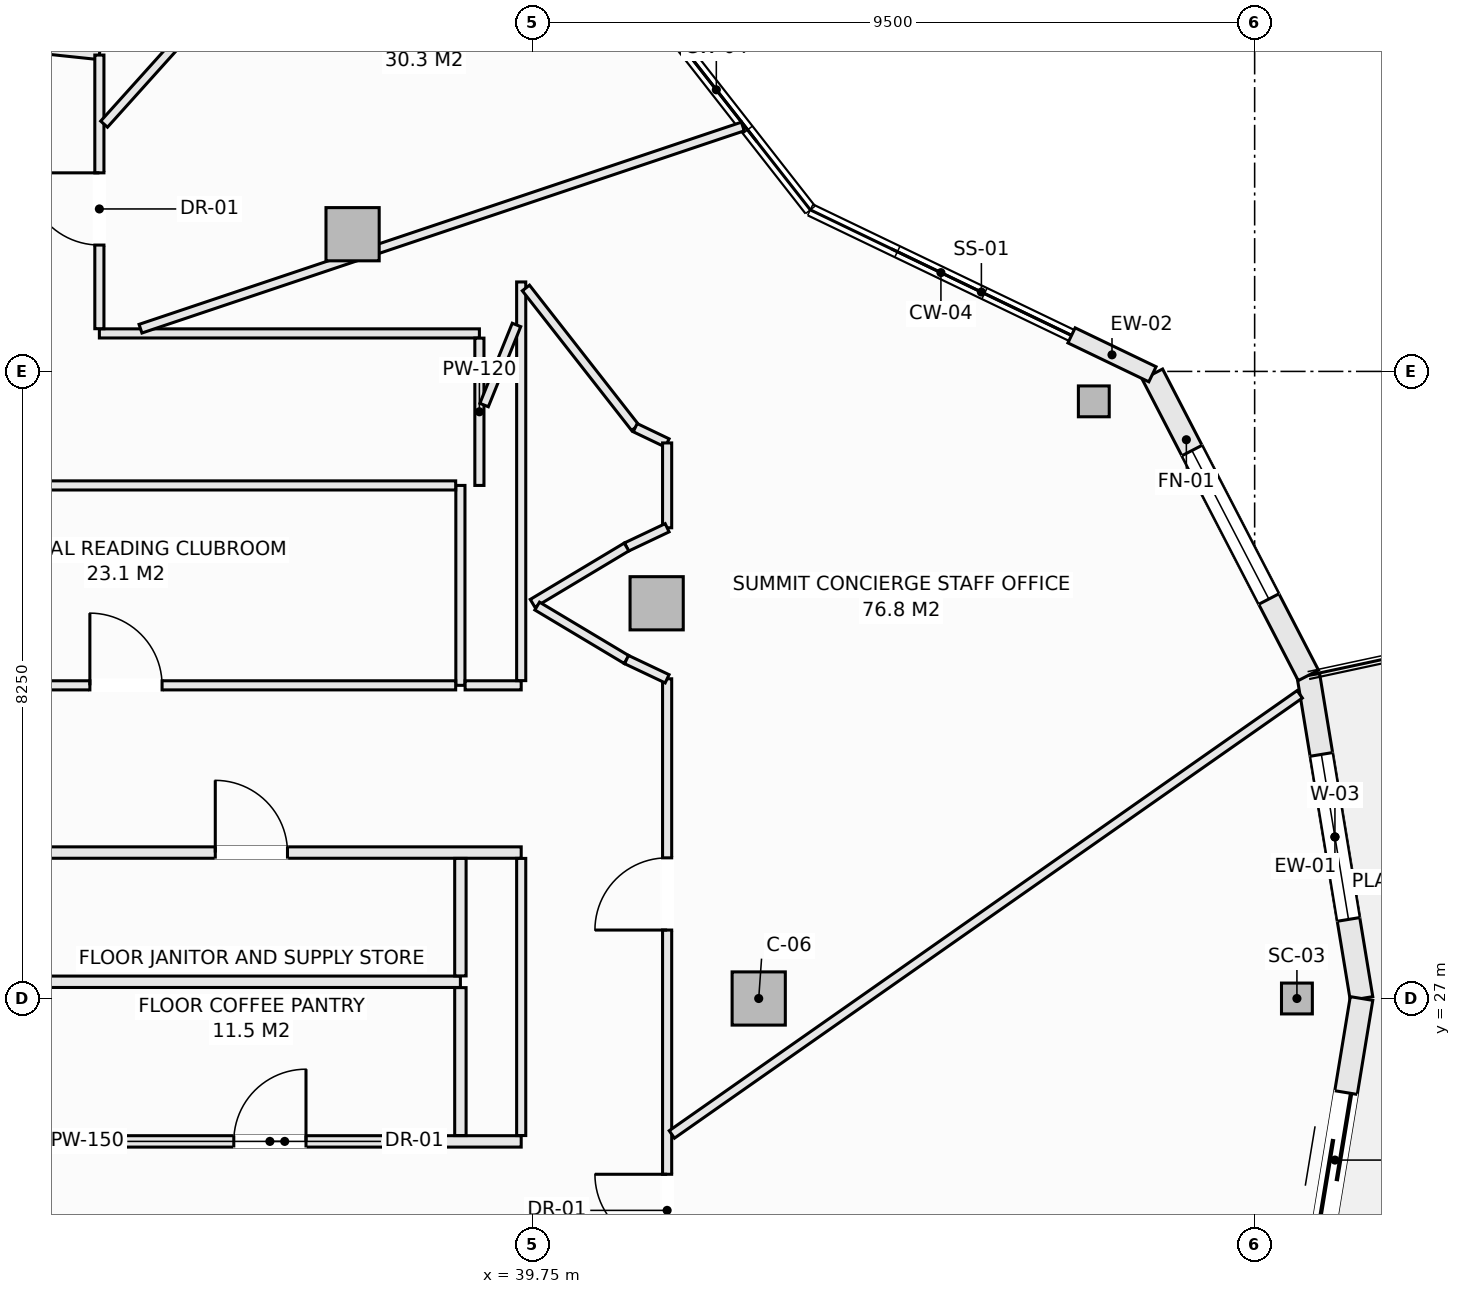
"""IFC4 building model, lengths in metres.
Left out: names, types, materials, properties, quantities, classifications, styles, units other than length and angle.
Written with IfcOpenShell. Run it as: python <this file> out.ifc"""

import sys

from ifc_helpers import new_model, si_unit, direction, frame, frame_2d, origin, origin_2d, place, context, subcontext, project, spatial, rectangle, hollow_rectangle, extrude, element, fill, save


model = new_model("IFC4")
c1 = context("Model", 3, precision=1e-05, world=origin(), true_north=direction((0.0, 1.0)))
c2 = subcontext(c1, "Body", "Model", "MODEL_VIEW")
j1 = project(units=[si_unit("LENGTHUNIT", "METRE"), si_unit("PLANEANGLEUNIT", "RADIAN")], contexts=[c1])
p1 = place(None, origin())
s1 = spatial("IfcSite", under=j1, at=p1, CompositionType="ELEMENT")
p2 = place(p1, origin())
s2 = spatial("IfcBuilding", under=s1, at=p2, CompositionType="ELEMENT")
p3 = place(p2, frame((0.0, 0.0, 272.3)))
s3 = spatial("IfcBuildingStorey", under=s2, at=p3, CompositionType="ELEMENT", Elevation=272.3)
for number, where, z_axis, x_axis in (
    (1, (49.806, 27.0, -0.27), (0.0, 0.0, 1.0), (1.0, 0.0, 0.0)),
    (2, (47.134, 34.856, -0.27), (0.0, 0.0, 1.0), (1.0, 0.0, 0.0)),
):
    element("IfcColumn", number, at=place(p3, frame(where, z_axis=z_axis, x_axis=x_axis)), inside=s3, PredefinedType="COLUMN", context=c2, shape_type="SweptSolid", body=[
        extrude(hollow_rectangle(XDim=0.406, YDim=0.406, WallThickness=0.016, at=origin_2d()), origin(), (0.0, 0.0, 1.0), 3.25),
    ])
for number, where, z_axis, x_axis in (
    (3, (42.725, 27.0, -0.27), (0.0, 0.0, 1.0), (1.0, 0.0, 0.0)),
    (4, (41.382, 32.199, -0.27), (0.0, 0.0, 1.0), (1.0, 0.0, 0.0)),
    (5, (37.382, 37.055, -0.27), (0.0, 0.0, 1.0), (1.0, 0.0, 0.0)),
):
    element("IfcColumn", number, at=place(p3, frame(where, z_axis=z_axis, x_axis=x_axis)), inside=s3, PredefinedType="COLUMN", context=c2, shape_type="SweptSolid", body=[
        extrude(rectangle(XDim=0.7, YDim=0.7, at=origin_2d()), origin(), (0.0, 0.0, 1.0), 3.25),
    ])
p4 = place(p3, frame((49.957, 31.251, 0.0), z_axis=(0.0, 0.0, 1.0), x_axis=(0.162404622434, -0.98672424649, 0.0)))
e6 = element("IfcWall", 6, at=p4, inside=s3, PredefinedType="SOLIDWALL", context=c2, shape_type="SweptSolid", body=[
    extrude(rectangle(XDim=4.308, YDim=0.3, at=frame_2d((2.154, 0.0))), origin(), (0.0, 0.0, 1.0), 2.555),
])
p5 = place(p4, frame((1.054, 0.0, 0.72)))
e7 = element("IfcOpeningElement", 7, at=p5, cuts=e6, PredefinedType="OPENING", context=c2, shape_type="SweptSolid", body=[
    extrude(rectangle(XDim=2.2, YDim=1.65, at=frame_2d((1.1, 0.825))), frame((0.0, 0.16, 0.0), z_axis=(0.0, -1.0, 0.0), x_axis=(1.0, 0.0, 0.0)), (0.0, 0.0, 1.0), 0.32),
])
p6 = place(p3, frame((47.906, 35.212, 0.0), z_axis=(0.0, 0.0, 1.0), x_axis=(0.459801070243, -0.888021945564, 0.0)))
e8 = element("IfcWall", 8, at=p6, inside=s3, PredefinedType="SOLIDWALL", context=c2, shape_type="SweptSolid", body=[
    extrude(rectangle(XDim=4.461, YDim=0.3, at=frame_2d((2.23, 0.0))), origin(), (0.0, 0.0, 1.0), 2.555),
])
p7 = place(p6, frame((1.13, 0.0, 0.72)))
e9 = element("IfcOpeningElement", 9, at=p7, cuts=e8, PredefinedType="OPENING", context=c2, shape_type="SweptSolid", body=[
    extrude(rectangle(XDim=2.2, YDim=1.65, at=frame_2d((1.1, 0.825))), frame((0.0, 0.16, 0.0), z_axis=(0.0, -1.0, 0.0), x_axis=(1.0, 0.0, 0.0)), (0.0, 0.0, 1.0), 0.32),
])
p8 = place(p3, frame((46.841, 35.724, 0.0), z_axis=(0.0, 0.0, 1.0), x_axis=(0.901303636532, -0.433187897769, 0.0)))
e10 = element("IfcWall", 10, at=p8, inside=s3, PredefinedType="SOLIDWALL", context=c2, shape_type="SweptSolid", body=[
    extrude(rectangle(XDim=1.181, YDim=0.22, at=frame_2d((0.591, 0.0))), origin(), (0.0, 0.0, 1.0), 2.555),
])
p9 = place(p3, frame((49.957, 22.749, 0.0), z_axis=(0.0, 0.0, 1.0), x_axis=(0.162404622434, 0.98672424649, 0.0)))
e11 = element("IfcWall", 11, at=p9, inside=s3, PredefinedType="SOLIDWALL", context=c2, shape_type="SweptSolid", body=[
    extrude(rectangle(XDim=4.308, YDim=0.3, at=frame_2d((2.154, 0.0))), origin(), (0.0, 0.0, 1.0), 2.555),
])
p10 = place(p9, frame((1.254, 0.0, 0.0)))
e12 = element("IfcOpeningElement", 12, at=p10, cuts=e11, PredefinedType="OPENING", context=c2, shape_type="SweptSolid", body=[
    extrude(rectangle(XDim=1.8, YDim=2.25, at=frame_2d((0.9, 1.125))), frame((0.0, 0.16, 0.0), z_axis=(0.0, -1.0, 0.0), x_axis=(1.0, 0.0, 0.0)), (0.0, 0.0, 1.0), 0.32),
])
p11 = place(p3, frame((30.077, 28.92, 0.0), z_axis=(0.0, 0.0, 1.0), x_axis=(1.0, 0.0, 0.0)))
e13 = element("IfcWall", 13, at=p11, inside=s3, PredefinedType="PARTITIONING", context=c2, shape_type="SweptSolid", body=[
    extrude(rectangle(XDim=9.523, YDim=0.15, at=frame_2d((4.762, 0.0))), origin(), (0.0, 0.0, 1.0), 2.98),
])
p12 = place(p11, frame((1.342, 0.0, 0.0)))
e14 = element("IfcOpeningElement", 14, at=p12, cuts=e13, PredefinedType="OPENING", context=c2, shape_type="SweptSolid", body=[
    extrude(rectangle(XDim=0.95, YDim=2.1, at=frame_2d((0.475, 1.05))), frame((0.0, 0.085, 0.0), z_axis=(0.0, -1.0, 0.0), x_axis=(1.0, 0.0, 0.0)), (0.0, 0.0, 1.0), 0.17),
])
p13 = place(p11, frame((5.498, 0.0, 0.0)))
e15 = element("IfcOpeningElement", 15, at=p13, cuts=e13, PredefinedType="OPENING", context=c2, shape_type="SweptSolid", body=[
    extrude(rectangle(XDim=0.95, YDim=2.1, at=frame_2d((0.475, 1.05))), frame((0.0, 0.085, 0.0), z_axis=(0.0, -1.0, 0.0), x_axis=(1.0, 0.0, 0.0)), (0.0, 0.0, 1.0), 0.17),
])
p14 = place(p3, frame((33.377, 25.12, 0.0), z_axis=(0.0, 0.0, 1.0), x_axis=(1.0, 0.0, 0.0)))
e16 = element("IfcWall", 16, at=p14, inside=s3, PredefinedType="PARTITIONING", context=c2, shape_type="SweptSolid", body=[
    extrude(rectangle(XDim=6.223, YDim=0.15, at=frame_2d((3.112, 0.0))), origin(), (0.0, 0.0, 1.0), 2.98),
])
p15 = place(p14, frame((2.441, 0.0, 0.0)))
e17 = element("IfcOpeningElement", 17, at=p15, cuts=e16, PredefinedType="OPENING", context=c2, shape_type="SweptSolid", body=[
    extrude(rectangle(XDim=0.95, YDim=2.1, at=frame_2d((0.475, 1.05))), frame((0.0, 0.085, 0.0), z_axis=(0.0, -1.0, 0.0), x_axis=(1.0, 0.0, 0.0)), (0.0, 0.0, 1.0), 0.17),
])
p16 = place(p3, frame((33.377, 27.22, 0.0), z_axis=(0.0, 0.0, 1.0), x_axis=(1.0, 0.0, 0.0)))
e18 = element("IfcWall", 18, at=p16, inside=s3, PredefinedType="PARTITIONING", context=c2, shape_type="SweptSolid", body=[
    extrude(rectangle(XDim=5.423, YDim=0.15, at=frame_2d((2.711, 0.0))), origin(), (0.0, 0.0, 1.0), 2.98),
])
p17 = place(p3, frame((38.8, 25.197, 0.0), z_axis=(0.0, 0.0, 1.0), x_axis=(0.0, 1.0, 0.0)))
e19 = element("IfcWall", 19, at=p17, inside=s3, PredefinedType="PARTITIONING", context=c2, shape_type="SweptSolid", body=[
    extrude(rectangle(XDim=1.946, YDim=0.15, at=frame_2d((0.973, 0.0))), origin(), (0.0, 0.0, 1.0), 2.98),
])
p18 = place(p3, frame((38.8, 27.297, 0.0), z_axis=(0.0, 0.0, 1.0), x_axis=(0.0, 1.0, 0.0)))
e20 = element("IfcWall", 20, at=p18, inside=s3, PredefinedType="PARTITIONING", context=c2, shape_type="SweptSolid", body=[
    extrude(rectangle(XDim=1.546, YDim=0.15, at=frame_2d((0.773, 0.0))), origin(), (0.0, 0.0, 1.0), 2.98),
])
p19 = place(p3, frame((38.8, 31.12, 0.0), z_axis=(0.0, 0.0, 1.0), x_axis=(0.0, 1.0, 0.0)))
e21 = element("IfcWall", 21, at=p19, inside=s3, PredefinedType="PARTITIONING", context=c2, shape_type="SweptSolid", body=[
    extrude(rectangle(XDim=2.63, YDim=0.12, at=frame_2d((1.315, 0.0))), origin(), (0.0, 0.0, 1.0), 2.98),
])
p20 = place(p3, frame((30.062, 31.12, 0.0), z_axis=(0.0, 0.0, 1.0), x_axis=(1.0, 0.0, 0.0)))
e22 = element("IfcWall", 22, at=p20, inside=s3, PredefinedType="PARTITIONING", context=c2, shape_type="SweptSolid", body=[
    extrude(rectangle(XDim=8.676, YDim=0.12, at=frame_2d((4.338, 0.0))), origin(), (0.0, 0.0, 1.0), 2.98),
])
p21 = place(p20, frame((3.863, 0.0, 0.0)))
e23 = element("IfcOpeningElement", 23, at=p21, cuts=e22, PredefinedType="OPENING", context=c2, shape_type="SweptSolid", body=[
    extrude(rectangle(XDim=0.95, YDim=2.1, at=frame_2d((0.475, 1.05))), frame((0.0, 0.07, 0.0), z_axis=(0.0, -1.0, 0.0), x_axis=(1.0, 0.0, 0.0)), (0.0, 0.0, 1.0), 0.14),
])
p22 = place(p3, frame((38.862, 31.12, 0.0), z_axis=(0.0, 0.0, 1.0), x_axis=(1.0, 0.0, 0.0)))
e24 = element("IfcWall", 24, at=p22, inside=s3, PredefinedType="PARTITIONING", context=c2, shape_type="SweptSolid", body=[
    extrude(rectangle(XDim=0.738, YDim=0.12, at=frame_2d((0.369, 0.0))), origin(), (0.0, 0.0, 1.0), 2.98),
])
p23 = place(p3, frame((30.062, 33.75, 0.0), z_axis=(0.0, 0.0, 1.0), x_axis=(1.0, 0.0, 0.0)))
e25 = element("IfcWall", 25, at=p23, inside=s3, PredefinedType="PARTITIONING", context=c2, shape_type="SweptSolid", body=[
    extrude(rectangle(XDim=8.676, YDim=0.12, at=frame_2d((4.338, 0.0))), origin(), (0.0, 0.0, 1.0), 2.98),
])
p24 = place(p3, frame((34.05, 35.75, 0.0), z_axis=(0.0, 0.0, 1.0), x_axis=(1.0, 0.0, 0.0)))
e26 = element("IfcWall", 26, at=p24, inside=s3, PredefinedType="PARTITIONING", context=c2, shape_type="SweptSolid", body=[
    extrude(rectangle(XDim=5.0, YDim=0.12, at=frame_2d((2.5, 0.0))), origin(), (0.0, 0.0, 1.0), 2.428),
])
p25 = place(p3, frame((32.212, 39.605, 0.0), z_axis=(0.0, 0.0, 1.0), x_axis=(0.994512688404, -0.1046160246, 0.0)))
e27 = element("IfcWall", 27, at=p25, inside=s3, PredefinedType="PARTITIONING", context=c2, shape_type="SweptSolid", body=[
    extrude(rectangle(XDim=1.848, YDim=0.12, at=frame_2d((0.924, 0.0))), origin(), (0.0, 0.0, 1.0), 2.98),
])
p26 = place(p3, frame((34.05, 35.812, 0.0), z_axis=(0.0, 0.0, 1.0), x_axis=(0.0, 1.0, 0.0)))
e28 = element("IfcWall", 28, at=p26, inside=s3, PredefinedType="PARTITIONING", context=c2, shape_type="SweptSolid", body=[
    extrude(rectangle(XDim=3.6, YDim=0.12, at=frame_2d((1.8, 0.0))), origin(), (0.0, 0.0, 1.0), 2.72),
])
p27 = place(p26, frame((1.1, 0.0, 0.0)))
e29 = element("IfcOpeningElement", 29, at=p27, cuts=e28, PredefinedType="OPENING", context=c2, shape_type="SweptSolid", body=[
    extrude(rectangle(XDim=0.95, YDim=2.1, at=frame_2d((0.475, 1.05))), frame((0.0, 0.07, 0.0), z_axis=(0.0, -1.0, 0.0), x_axis=(1.0, 0.0, 0.0)), (0.0, 0.0, 1.0), 0.14),
])
p28 = place(p3, frame((39.05, 33.75, 0.0), z_axis=(0.0, 0.0, 1.0), x_axis=(0.0, 1.0, 0.0)))
e30 = element("IfcWall", 30, at=p28, inside=s3, PredefinedType="PARTITIONING", context=c2, shape_type="SweptSolid", body=[
    extrude(rectangle(XDim=1.938, YDim=0.12, at=frame_2d((0.969, 0.0))), origin(), (0.0, 0.0, 1.0), 2.98),
])
p29 = place(p3, frame((39.6, 25.197, 0.0), z_axis=(0.0, 0.0, 1.0), x_axis=(0.0, 1.0, 0.0)))
e31 = element("IfcWall", 31, at=p29, inside=s3, PredefinedType="PARTITIONING", context=c2, shape_type="SweptSolid", body=[
    extrude(rectangle(XDim=3.646, YDim=0.12, at=frame_2d((1.823, 0.0))), origin(), (0.0, 0.0, 1.0), 2.98),
])
p30 = place(p3, frame((39.6, 31.182, 0.0), z_axis=(0.0, 0.0, 1.0), x_axis=(0.0, 1.0, 0.0)))
e32 = element("IfcWall", 32, at=p30, inside=s3, PredefinedType="PARTITIONING", context=c2, shape_type="SweptSolid", body=[
    extrude(rectangle(XDim=5.245, YDim=0.12, at=frame_2d((2.623, 0.0))), origin(), (0.0, 0.0, 1.0), 2.98),
])
p31 = place(p3, frame((39.662, 36.348, 0.0), z_axis=(0.0, 0.0, 1.0), x_axis=(0.616212345115, -0.78758005671, 0.0)))
e33 = element("IfcWall", 33, at=p31, inside=s3, PredefinedType="PARTITIONING", context=c2, shape_type="SweptSolid", body=[
    extrude(rectangle(XDim=2.333, YDim=0.12, at=frame_2d((1.167, 0.0))), origin(), (0.0, 0.0, 1.0), 2.98),
])
p32 = place(p3, frame((41.1, 34.51, 0.0), z_axis=(0.0, 0.0, 1.0), x_axis=(0.902054328377, -0.431622507125, 0.0)))
e34 = element("IfcWall", 34, at=p32, inside=s3, PredefinedType="PARTITIONING", context=c2, shape_type="SweptSolid", body=[
    extrude(rectangle(XDim=0.466, YDim=0.12, at=frame_2d((0.233, 0.0))), origin(), (0.0, 0.0, 1.0), 2.98),
])
p33 = place(p3, frame((41.52, 22.794, 0.0), z_axis=(0.0, 0.0, 1.0), x_axis=(0.0, 1.0, 0.0)))
e35 = element("IfcWall", 35, at=p33, inside=s3, PredefinedType="PARTITIONING", context=c2, shape_type="SweptSolid", body=[
    extrude(rectangle(XDim=8.412, YDim=0.12, at=frame_2d((4.206, 0.0))), origin(), (0.0, 0.0, 1.0), 2.428),
])
p34 = place(p33, frame((0.944, 0.0, 0.0)))
e36 = element("IfcOpeningElement", 36, at=p34, cuts=e35, PredefinedType="OPENING", context=c2, shape_type="SweptSolid", body=[
    extrude(rectangle(XDim=0.95, YDim=2.1, at=frame_2d((0.475, 1.05))), frame((0.0, 0.07, 0.0), z_axis=(0.0, -1.0, 0.0), x_axis=(1.0, 0.0, 0.0)), (0.0, 0.0, 1.0), 0.14),
])
p35 = place(p33, frame((5.106, 0.0, 0.0)))
e37 = element("IfcOpeningElement", 37, at=p35, cuts=e35, PredefinedType="OPENING", context=c2, shape_type="SweptSolid", body=[
    extrude(rectangle(XDim=0.95, YDim=2.1, at=frame_2d((0.475, 1.05))), frame((0.0, 0.07, 0.0), z_axis=(0.0, -1.0, 0.0), x_axis=(1.0, 0.0, 0.0)), (0.0, 0.0, 1.0), 0.14),
])
p36 = place(p3, frame((41.52, 33.193, 0.0), z_axis=(0.0, 0.0, 1.0), x_axis=(0.0, 1.0, 0.0)))
e38 = element("IfcWall", 38, at=p36, inside=s3, PredefinedType="PARTITIONING", context=c2, shape_type="SweptSolid", body=[
    extrude(rectangle(XDim=1.116, YDim=0.12, at=frame_2d((0.558, 0.0))), origin(), (0.0, 0.0, 1.0), 2.98),
])
p37 = place(p3, frame((40.986, 32.94, 0.0), z_axis=(0.0, 0.0, 1.0), x_axis=(0.90356951601, 0.428441512621, 0.0)))
e39 = element("IfcWall", 39, at=p37, inside=s3, PredefinedType="PARTITIONING", context=c2, shape_type="SweptSolid", body=[
    extrude(rectangle(XDim=0.591, YDim=0.12, at=frame_2d((0.295, 0.0))), origin(), (0.0, 0.0, 1.0), 2.98),
])
p38 = place(p3, frame((39.75, 32.199, 0.0), z_axis=(0.0, 0.0, 1.0), x_axis=(0.857702120906, 0.514146935996, 0.0)))
e40 = element("IfcWall", 40, at=p38, inside=s3, PredefinedType="PARTITIONING", context=c2, shape_type="SweptSolid", body=[
    extrude(rectangle(XDim=1.441, YDim=0.12, at=frame_2d((0.721, 0.0))), origin(), (0.0, 0.0, 1.0), 2.98),
])
p39 = place(p3, frame((39.81, 32.163, 0.0), z_axis=(0.0, 0.0, 1.0), x_axis=(0.858011245414, -0.513630901273, 0.0)))
e41 = element("IfcWall", 41, at=p39, inside=s3, PredefinedType="PARTITIONING", context=c2, shape_type="SweptSolid", body=[
    extrude(rectangle(XDim=1.37, YDim=0.12, at=frame_2d((0.685, 0.0))), origin(), (0.0, 0.0, 1.0), 2.98),
])
p40 = place(p3, frame((40.986, 31.459, 0.0), z_axis=(0.0, 0.0, 1.0), x_axis=(0.903729424576, -0.428104107847, 0.0)))
e42 = element("IfcWall", 42, at=p40, inside=s3, PredefinedType="PARTITIONING", context=c2, shape_type="SweptSolid", body=[
    extrude(rectangle(XDim=0.591, YDim=0.12, at=frame_2d((0.295, 0.0))), origin(), (0.0, 0.0, 1.0), 2.98),
])
p41 = place(p3, frame((34.591, 35.812, 0.0), z_axis=(0.0, 0.0, 1.0), x_axis=(0.94801826347, 0.318215920605, 0.0)))
e43 = element("IfcWall", 43, at=p41, inside=s3, PredefinedType="PARTITIONING", context=c2, shape_type="SweptSolid", body=[
    extrude(rectangle(XDim=8.36, YDim=0.12, at=frame_2d((4.18, 0.0))), origin(), (0.0, 0.0, 1.0), 2.98),
])
p42 = place(p3, frame((41.582, 25.211, 0.0), z_axis=(0.0, 0.0, 1.0), x_axis=(0.818871371676, 0.573977069795, 0.0)))
e44 = element("IfcWall", 44, at=p42, inside=s3, PredefinedType="PARTITIONING", context=c2, shape_type="SweptSolid", body=[
    extrude(rectangle(XDim=10.089, YDim=0.12, at=frame_2d((5.044, 0.0))), origin(), (0.0, 0.0, 1.0), 2.428),
])
p43 = place(p3, frame((39.112, 34.808, 0.0), z_axis=(0.0, 0.0, 1.0), x_axis=(0.374757755012, 0.927122766983, 0.0)))
e45 = element("IfcWall", 45, at=p43, inside=s3, PredefinedType="PARTITIONING", context=c2, shape_type="SweptSolid", body=[
    extrude(rectangle(XDim=1.137, YDim=0.12, at=frame_2d((0.568, 0.0))), origin(), (0.0, 0.0, 1.0), 2.98),
])
p44 = place(p3, frame((34.112, 38.503, 0.0), z_axis=(0.0, 0.0, 1.0), x_axis=(0.668788041067, 0.743453129744, 0.0)))
e46 = element("IfcWall", 46, at=p44, inside=s3, PredefinedType="PARTITIONING", context=c2, shape_type="SweptSolid", body=[
    extrude(rectangle(XDim=4.81, YDim=0.12, at=frame_2d((2.405, 0.0))), origin(), (0.0, 0.0, 1.0), 2.98),
])
p45 = place(p5, origin())
e47 = element("IfcWindow", 47, at=p45, inside=s3, PartitioningType="SINGLE_PANEL", PredefinedType="WINDOW", context=c2, shape_type="SweptSolid", body=[
    extrude(rectangle(XDim=2.2, YDim=1.65, at=frame_2d((1.1, 0.825))), frame((0.0, 0.03, 0.0), z_axis=(0.0, -1.0, 0.0), x_axis=(1.0, 0.0, 0.0)), (0.0, 0.0, 1.0), 0.06),
])
fill(e7, e47)
p46 = place(p7, origin())
e48 = element("IfcWindow", 48, at=p46, inside=s3, PartitioningType="SINGLE_PANEL", PredefinedType="WINDOW", context=c2, shape_type="SweptSolid", body=[
    extrude(rectangle(XDim=2.2, YDim=1.65, at=frame_2d((1.1, 0.825))), frame((0.0, 0.03, 0.0), z_axis=(0.0, -1.0, 0.0), x_axis=(1.0, 0.0, 0.0)), (0.0, 0.0, 1.0), 0.06),
])
fill(e9, e48)
p47 = place(p10, frame((1.8, 0.0, 0.0), z_axis=(0.0, 0.0, 1.0), x_axis=(-1.0, 0.0, 0.0)))
e49 = element("IfcDoor", 49, at=p47, inside=s3, OperationType="SLIDING_TO_LEFT", PredefinedType="DOOR", context=c2, shape_type="SweptSolid", body=[
    extrude(rectangle(XDim=1.8, YDim=2.25, at=frame_2d((0.9, 1.125))), frame((0.0, 0.025, 0.0), z_axis=(0.0, -1.0, 0.0), x_axis=(1.0, 0.0, 0.0)), (0.0, 0.0, 1.0), 0.05),
])
fill(e12, e49)
p48 = place(p13, origin())
e50 = element("IfcDoor", 50, at=p48, inside=s3, OperationType="SINGLE_SWING_LEFT", PredefinedType="DOOR", context=c2, shape_type="SweptSolid", body=[
    extrude(rectangle(XDim=0.95, YDim=2.1, at=frame_2d((0.475, 1.05))), frame((0.0, 0.025, 0.0), z_axis=(0.0, -1.0, 0.0), x_axis=(1.0, 0.0, 0.0)), (0.0, 0.0, 1.0), 0.05),
])
fill(e15, e50)
p49 = place(p15, origin())
e51 = element("IfcDoor", 51, at=p49, inside=s3, OperationType="SINGLE_SWING_RIGHT", PredefinedType="DOOR", context=c2, shape_type="SweptSolid", body=[
    extrude(rectangle(XDim=0.95, YDim=2.1, at=frame_2d((0.475, 1.05))), frame((0.0, 0.025, 0.0), z_axis=(0.0, -1.0, 0.0), x_axis=(1.0, 0.0, 0.0)), (0.0, 0.0, 1.0), 0.05),
])
fill(e17, e51)
p50 = place(p21, origin())
e52 = element("IfcDoor", 52, at=p50, inside=s3, OperationType="SINGLE_SWING_LEFT", PredefinedType="DOOR", context=c2, shape_type="SweptSolid", body=[
    extrude(rectangle(XDim=0.95, YDim=2.1, at=frame_2d((0.475, 1.05))), frame((0.0, 0.025, 0.0), z_axis=(0.0, -1.0, 0.0), x_axis=(1.0, 0.0, 0.0)), (0.0, 0.0, 1.0), 0.05),
])
fill(e23, e52)
p51 = place(p34, origin())
e53 = element("IfcDoor", 53, at=p51, inside=s3, OperationType="SINGLE_SWING_RIGHT", PredefinedType="DOOR", context=c2, shape_type="SweptSolid", body=[
    extrude(rectangle(XDim=0.95, YDim=2.1, at=frame_2d((0.475, 1.05))), frame((0.0, 0.025, 0.0), z_axis=(0.0, -1.0, 0.0), x_axis=(1.0, 0.0, 0.0)), (0.0, 0.0, 1.0), 0.05),
])
fill(e36, e53)
p52 = place(p35, origin())
e54 = element("IfcDoor", 54, at=p52, inside=s3, OperationType="SINGLE_SWING_LEFT", PredefinedType="DOOR", context=c2, shape_type="SweptSolid", body=[
    extrude(rectangle(XDim=0.95, YDim=2.1, at=frame_2d((0.475, 1.05))), frame((0.0, 0.025, 0.0), z_axis=(0.0, -1.0, 0.0), x_axis=(1.0, 0.0, 0.0)), (0.0, 0.0, 1.0), 0.05),
])
fill(e37, e54)
p53 = place(p27, origin())
e55 = element("IfcDoor", 55, at=p53, inside=s3, OperationType="SINGLE_SWING_RIGHT", PredefinedType="DOOR", context=c2, shape_type="SweptSolid", body=[
    extrude(rectangle(XDim=0.95, YDim=2.1, at=frame_2d((0.475, 1.05))), frame((0.0, 0.025, 0.0), z_axis=(0.0, -1.0, 0.0), x_axis=(1.0, 0.0, 0.0)), (0.0, 0.0, 1.0), 0.05),
])
fill(e29, e55)
save(model, sys.argv[1])
